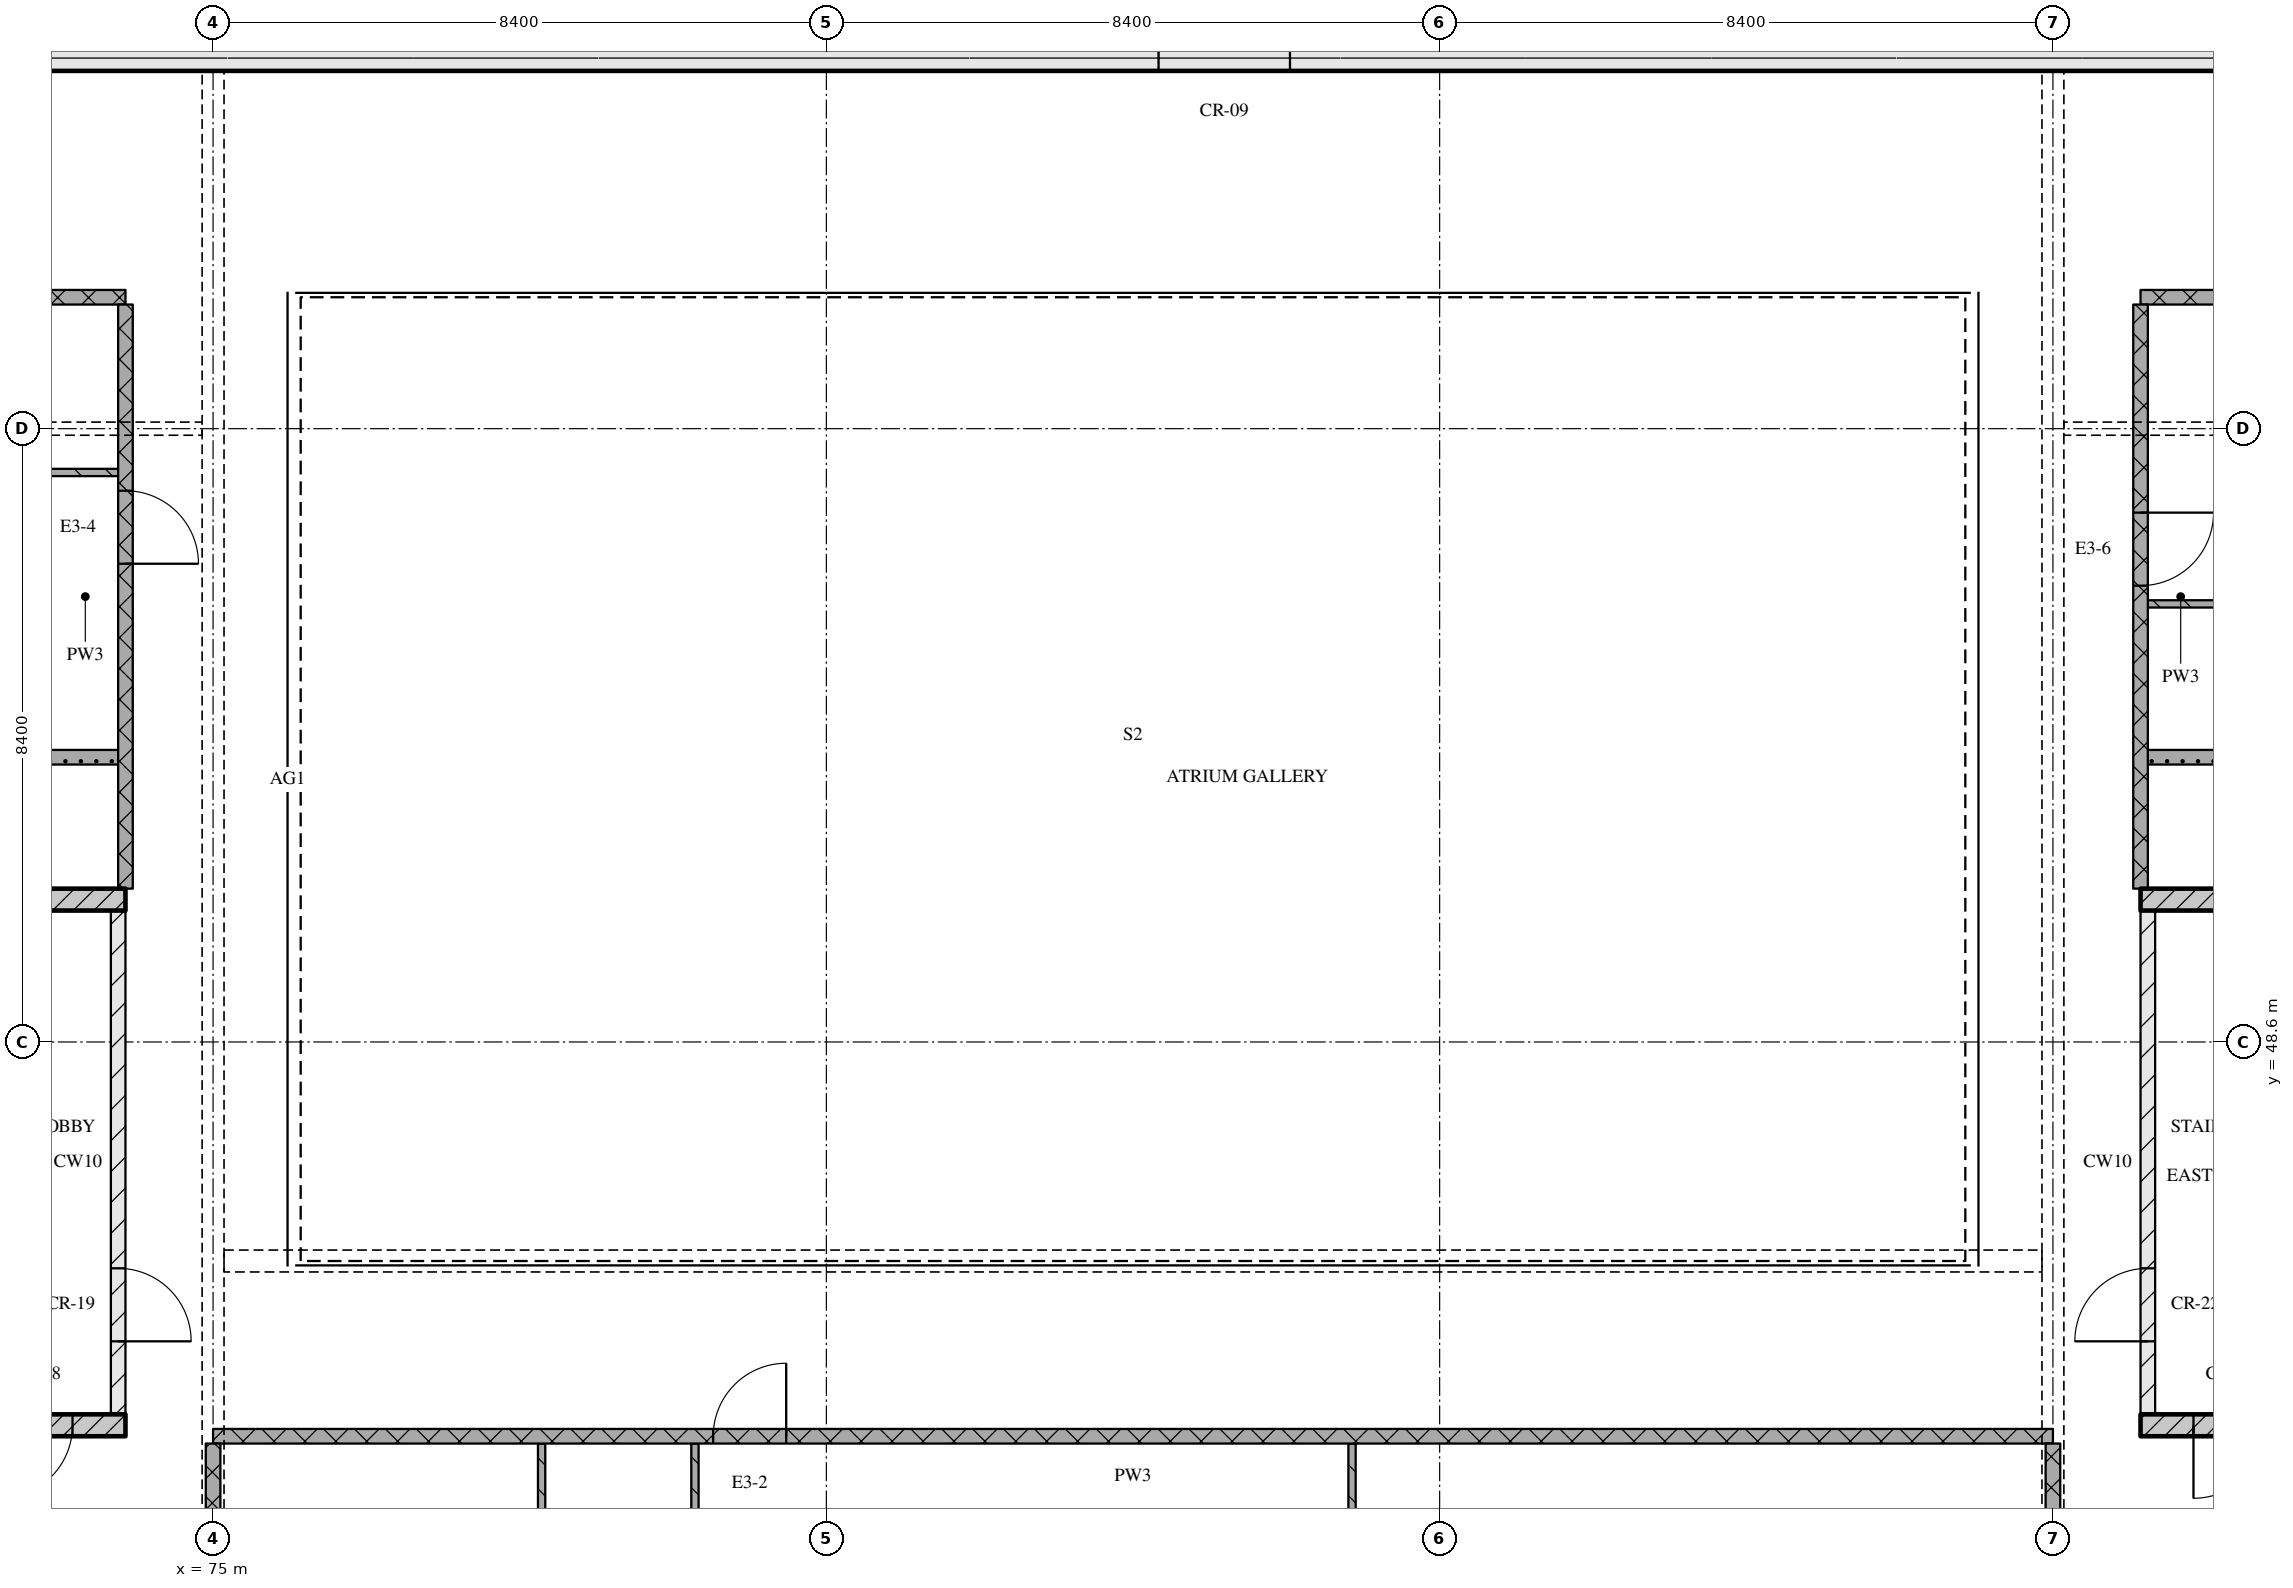
"""IFC4 building model, lengths in metres.
Left out: names, types, materials, properties, quantities, classifications, styles, units other than length and angle.
Written with IfcOpenShell. Run it as: python <this file> out.ifc"""

import sys

from ifc_helpers import new_model, si_unit, direction, frame, frame_2d, origin, place, context, subcontext, project, spatial, rectangle, extrude, element, fill, save


model = new_model("IFC4")
c1 = context("Model", 3, precision=1e-05, world=origin(), true_north=direction((0.0, 1.0)))
c2 = subcontext(c1, "Body", "Model", "MODEL_VIEW")
j1 = project(units=[si_unit("LENGTHUNIT", "METRE"), si_unit("PLANEANGLEUNIT", "RADIAN")], contexts=[c1])
p1 = place(None, origin())
s1 = spatial("IfcSite", under=j1, at=p1, CompositionType="ELEMENT")
p2 = place(p1, origin())
s2 = spatial("IfcBuilding", under=s1, at=p2, CompositionType="ELEMENT")
p3 = place(p2, frame((0.0, 0.0, 274.35)))
s3 = spatial("IfcBuildingStorey", under=s2, at=p3, CompositionType="ELEMENT", Elevation=274.35)
p4 = place(p3, frame((67.3, 62.15, 0.0), z_axis=(0.0, 0.0, 1.0), x_axis=(1.0, 0.0, 0.0)))
e1 = element("IfcWall", 1, at=p4, inside=s3, PredefinedType="SOLIDWALL", context=c2, shape_type="SweptSolid", body=[
    extrude(rectangle(XDim=40.6, YDim=0.5, at=frame_2d((20.3, 0.0))), origin(), (0.0, 0.0, 1.0), 3.32),
])
p5 = place(p4, frame((20.65, 0.0, 0.0)))
e2 = element("IfcOpeningElement", 2, at=p5, cuts=e1, PredefinedType="OPENING", context=c2, shape_type="SweptSolid", body=[
    extrude(rectangle(XDim=1.8, YDim=2.1, at=frame_2d((0.9, 1.05))), frame((0.0, 0.26, 0.0), z_axis=(0.0, -1.0, 0.0), x_axis=(1.0, 0.0, 0.0)), (0.0, 0.0, 1.0), 0.52),
])
p6 = place(p3, frame((68.2, 43.35, 0.0), z_axis=(0.0, 0.0, 1.0), x_axis=(1.0, 0.0, 0.0)))
e3 = element("IfcWall", 3, at=p6, inside=s3, PredefinedType="SOLIDWALL", context=c2, shape_type="SweptSolid", body=[
    extrude(rectangle(XDim=5.6, YDim=0.3, at=frame_2d((2.8, 0.0))), origin(), (0.0, 0.0, 1.0), 3.32),
])
p7 = place(p6, frame((3.875, 0.0, 0.0)))
e4 = element("IfcOpeningElement", 4, at=p7, cuts=e3, PredefinedType="OPENING", context=c2, shape_type="SweptSolid", body=[
    extrude(rectangle(XDim=1.0, YDim=2.1, at=frame_2d((0.5, 1.05))), frame((0.0, 0.16, 0.0), z_axis=(0.0, -1.0, 0.0), x_axis=(1.0, 0.0, 0.0)), (0.0, 0.0, 1.0), 0.32),
])
p8 = place(p3, frame((73.7, 43.5, 0.0), z_axis=(0.0, 0.0, 1.0), x_axis=(0.0, 1.0, 0.0)))
e5 = element("IfcWall", 5, at=p8, inside=s3, PredefinedType="PARTITIONING", context=c2, shape_type="SweptSolid", body=[
    extrude(rectangle(XDim=6.9, YDim=0.2, at=frame_2d((3.45, 0.0))), origin(), (0.0, 0.0, 1.0), 3.32),
])
p9 = place(p8, frame((1.0, 0.0, 0.0)))
e6 = element("IfcOpeningElement", 6, at=p9, cuts=e5, PredefinedType="OPENING", context=c2, shape_type="SweptSolid", body=[
    extrude(rectangle(XDim=1.0, YDim=2.1, at=frame_2d((0.5, 1.05))), frame((0.0, 0.11, 0.0), z_axis=(0.0, -1.0, 0.0), x_axis=(1.0, 0.0, 0.0)), (0.0, 0.0, 1.0), 0.22),
])
p10 = place(p3, frame((68.2, 50.55, 0.0), z_axis=(0.0, 0.0, 1.0), x_axis=(1.0, 0.0, 0.0)))
e7 = element("IfcWall", 7, at=p10, inside=s3, PredefinedType="SOLIDWALL", context=c2, shape_type="SweptSolid", body=[
    extrude(rectangle(XDim=5.6, YDim=0.3, at=frame_2d((2.8, 0.0))), origin(), (0.0, 0.0, 1.0), 3.32),
])
p11 = place(p3, frame((101.4, 43.35, 0.0), z_axis=(0.0, 0.0, 1.0), x_axis=(1.0, 0.0, 0.0)))
e8 = element("IfcWall", 8, at=p11, inside=s3, PredefinedType="SOLIDWALL", context=c2, shape_type="SweptSolid", body=[
    extrude(rectangle(XDim=5.6, YDim=0.3, at=frame_2d((2.8, 0.0))), origin(), (0.0, 0.0, 1.0), 3.32),
])
p12 = place(p11, frame((0.725, 0.0, 0.0)))
e9 = element("IfcOpeningElement", 9, at=p12, cuts=e8, PredefinedType="OPENING", context=c2, shape_type="SweptSolid", body=[
    extrude(rectangle(XDim=1.0, YDim=2.1, at=frame_2d((0.5, 1.05))), frame((0.0, 0.16, 0.0), z_axis=(0.0, -1.0, 0.0), x_axis=(1.0, 0.0, 0.0)), (0.0, 0.0, 1.0), 0.32),
])
p13 = place(p3, frame((101.5, 43.5, 0.0), z_axis=(0.0, 0.0, 1.0), x_axis=(0.0, 1.0, 0.0)))
e10 = element("IfcWall", 10, at=p13, inside=s3, PredefinedType="PARTITIONING", context=c2, shape_type="SweptSolid", body=[
    extrude(rectangle(XDim=6.9, YDim=0.2, at=frame_2d((3.45, 0.0))), origin(), (0.0, 0.0, 1.0), 3.32),
])
p14 = place(p13, frame((1.0, 0.0, 0.0)))
e11 = element("IfcOpeningElement", 11, at=p14, cuts=e10, PredefinedType="OPENING", context=c2, shape_type="SweptSolid", body=[
    extrude(rectangle(XDim=1.0, YDim=2.1, at=frame_2d((0.5, 1.05))), frame((0.0, 0.11, 0.0), z_axis=(0.0, -1.0, 0.0), x_axis=(1.0, 0.0, 0.0)), (0.0, 0.0, 1.0), 0.22),
])
p15 = place(p3, frame((101.4, 50.55, 0.0), z_axis=(0.0, 0.0, 1.0), x_axis=(1.0, 0.0, 0.0)))
e12 = element("IfcWall", 12, at=p15, inside=s3, PredefinedType="SOLIDWALL", context=c2, shape_type="SweptSolid", body=[
    extrude(rectangle(XDim=5.6, YDim=0.3, at=frame_2d((2.8, 0.0))), origin(), (0.0, 0.0, 1.0), 3.32),
])
p16 = place(p3, frame((100.2, 43.2, 0.0), z_axis=(0.0, 0.0, 1.0), x_axis=(-1.0, 0.0, 0.0)))
e13 = element("IfcWall", 13, at=p16, inside=s3, PredefinedType="PARTITIONING", context=c2, shape_type="SweptSolid", body=[
    extrude(rectangle(XDim=25.2, YDim=0.2, at=frame_2d((12.6, 0.0))), origin(), (0.0, 0.0, 1.0), 3.32),
])
p17 = place(p16, frame((17.35, 0.0, 0.0)))
e14 = element("IfcOpeningElement", 14, at=p17, cuts=e13, PredefinedType="OPENING", context=c2, shape_type="SweptSolid", body=[
    extrude(rectangle(XDim=1.0, YDim=2.1, at=frame_2d((0.5, 1.05))), frame((0.0, 0.11, 0.0), z_axis=(0.0, -1.0, 0.0), x_axis=(1.0, 0.0, 0.0)), (0.0, 0.0, 1.0), 0.22),
])
for number, where, z_axis, x_axis in (
    (15, (56.68, 52.5, 0.0), (0.0, 0.0, 1.0), (1.0, 0.0, 0.0)),
    (16, (101.5, 52.5, 0.0), (0.0, 0.0, 1.0), (1.0, 0.0, 0.0)),
):
    element("IfcWall", number, at=place(p3, frame(where, z_axis=z_axis, x_axis=x_axis)), inside=s3, PredefinedType="PARTITIONING", context=c2, shape_type="SweptSolid", body=[
        extrude(rectangle(XDim=17.02, YDim=0.2, at=frame_2d((8.51, 0.0))), origin(), (0.0, 0.0, 1.0), 3.32),
    ])
for number, where, z_axis, x_axis in (
    (17, (101.5, 54.6, 0.0), (0.0, 0.0, 1.0), (1.0, 0.0, 0.0)),
    (18, (65.7, 56.4, 0.0), (0.0, 0.0, 1.0), (1.0, 0.0, 0.0)),
):
    element("IfcWall", number, at=place(p3, frame(where, z_axis=z_axis, x_axis=x_axis)), inside=s3, PredefinedType="PARTITIONING", context=c2, shape_type="SweptSolid", body=[
        extrude(rectangle(XDim=8.0, YDim=0.1, at=frame_2d((4.0, 0.0))), origin(), (0.0, 0.0, 1.0), 3.32),
    ])
for number, where, z_axis, x_axis in (
    (19, (64.2, 58.8, 0.0), (0.0, 0.0, 1.0), (1.0, 0.0, 0.0)),
    (20, (101.4, 58.8, 0.0), (0.0, 0.0, 1.0), (1.0, 0.0, 0.0)),
):
    element("IfcWall", number, at=place(p3, frame(where, z_axis=z_axis, x_axis=x_axis)), inside=s3, PredefinedType="PARTITIONING", context=c2, shape_type="SweptSolid", body=[
        extrude(rectangle(XDim=9.6, YDim=0.2, at=frame_2d((4.8, 0.0))), origin(), (0.0, 0.0, 1.0), 3.32),
    ])
p18 = place(p3, frame((73.8, 50.7, 0.0), z_axis=(0.0, 0.0, 1.0), x_axis=(0.0, 1.0, 0.0)))
e21 = element("IfcWall", 21, at=p18, inside=s3, PredefinedType="PARTITIONING", context=c2, shape_type="SweptSolid", body=[
    extrude(rectangle(XDim=8.0, YDim=0.2, at=frame_2d((4.0, 0.0))), origin(), (0.0, 0.0, 1.0), 3.32),
])
p19 = place(p18, frame((4.45, 0.0, 0.0)))
e22 = element("IfcOpeningElement", 22, at=p19, cuts=e21, PredefinedType="OPENING", context=c2, shape_type="SweptSolid", body=[
    extrude(rectangle(XDim=1.0, YDim=2.1, at=frame_2d((0.5, 1.05))), frame((0.0, 0.11, 0.0), z_axis=(0.0, -1.0, 0.0), x_axis=(1.0, 0.0, 0.0)), (0.0, 0.0, 1.0), 0.22),
])
p20 = place(p3, frame((75.0, 43.1, 0.0), z_axis=(0.0, 0.0, 1.0), x_axis=(0.0, -1.0, 0.0)))
e23 = element("IfcWall", 23, at=p20, inside=s3, PredefinedType="PARTITIONING", context=c2, shape_type="SweptSolid", body=[
    extrude(rectangle(XDim=2.2, YDim=0.2, at=frame_2d((1.1, 0.0))), origin(), (0.0, 0.0, 1.0), 2.53),
])
p21 = place(p3, frame((79.5, 43.1, 0.0), z_axis=(0.0, 0.0, 1.0), x_axis=(0.0, -1.0, 0.0)))
e24 = element("IfcWall", 24, at=p21, inside=s3, PredefinedType="PARTITIONING", context=c2, shape_type="SweptSolid", body=[
    extrude(rectangle(XDim=4.95, YDim=0.1, at=frame_2d((2.475, 0.0))), origin(), (0.0, 0.0, 1.0), 3.32),
])
p22 = place(p3, frame((81.6, 38.15, 0.0), z_axis=(0.0, 0.0, 1.0), x_axis=(0.0, 1.0, 0.0)))
e25 = element("IfcWall", 25, at=p22, inside=s3, PredefinedType="PARTITIONING", context=c2, shape_type="SweptSolid", body=[
    extrude(rectangle(XDim=4.95, YDim=0.1, at=frame_2d((2.475, 0.0))), origin(), (0.0, 0.0, 1.0), 3.32),
])
p23 = place(p22, frame((2.1, 0.0, 0.0)))
e26 = element("IfcOpeningElement", 26, at=p23, cuts=e25, PredefinedType="OPENING", context=c2, shape_type="SweptSolid", body=[
    extrude(rectangle(XDim=0.8, YDim=2.1, at=frame_2d((0.4, 1.05))), frame((0.0, 0.06, 0.0), z_axis=(0.0, -1.0, 0.0), x_axis=(1.0, 0.0, 0.0)), (0.0, 0.0, 1.0), 0.12),
])
p24 = place(p3, frame((90.6, 43.1, 0.0), z_axis=(0.0, 0.0, 1.0), x_axis=(0.0, -1.0, 0.0)))
e27 = element("IfcWall", 27, at=p24, inside=s3, PredefinedType="PARTITIONING", context=c2, shape_type="SweptSolid", body=[
    extrude(rectangle(XDim=4.95, YDim=0.1, at=frame_2d((2.475, 0.0))), origin(), (0.0, 0.0, 1.0), 3.32),
])
p25 = place(p3, frame((100.2, 43.1, 0.0), z_axis=(0.0, 0.0, 1.0), x_axis=(0.0, -1.0, 0.0)))
e28 = element("IfcWall", 28, at=p25, inside=s3, PredefinedType="PARTITIONING", context=c2, shape_type="SweptSolid", body=[
    extrude(rectangle(XDim=2.2, YDim=0.2, at=frame_2d((1.1, 0.0))), origin(), (0.0, 0.0, 1.0), 2.53),
])
p26 = place(p3, frame((101.4, 58.7, 0.0), z_axis=(0.0, 0.0, 1.0), x_axis=(0.0, -1.0, 0.0)))
e29 = element("IfcWall", 29, at=p26, inside=s3, PredefinedType="PARTITIONING", context=c2, shape_type="SweptSolid", body=[
    extrude(rectangle(XDim=8.0, YDim=0.2, at=frame_2d((4.0, 0.0))), origin(), (0.0, 0.0, 1.0), 3.32),
])
p27 = place(p26, frame((2.85, 0.0, 0.0)))
e30 = element("IfcOpeningElement", 30, at=p27, cuts=e29, PredefinedType="OPENING", context=c2, shape_type="SweptSolid", body=[
    extrude(rectangle(XDim=1.0, YDim=2.1, at=frame_2d((0.5, 1.05))), frame((0.0, 0.11, 0.0), z_axis=(0.0, -1.0, 0.0), x_axis=(1.0, 0.0, 0.0)), (0.0, 0.0, 1.0), 0.22),
])
p28 = place(p5, origin())
e31 = element("IfcDoor", 31, at=p28, inside=s3, OperationType="DOUBLE_DOOR_SINGLE_SWING", PredefinedType="DOOR", context=c2, shape_type="SweptSolid", body=[
    extrude(rectangle(XDim=1.8, YDim=2.1, at=frame_2d((0.9, 1.05))), frame((0.0, 0.025, 0.0), z_axis=(0.0, -1.0, 0.0), x_axis=(1.0, 0.0, 0.0)), (0.0, 0.0, 1.0), 0.05),
])
fill(e2, e31)
p29 = place(p7, origin())
e32 = element("IfcDoor", 32, at=p29, inside=s3, OperationType="SINGLE_SWING_RIGHT", PredefinedType="DOOR", context=c2, shape_type="SweptSolid", body=[
    extrude(rectangle(XDim=1.0, YDim=2.1, at=frame_2d((0.5, 1.05))), frame((0.0, 0.025, 0.0), z_axis=(0.0, -1.0, 0.0), x_axis=(1.0, 0.0, 0.0)), (0.0, 0.0, 1.0), 0.05),
])
fill(e4, e32)
p30 = place(p9, origin())
e33 = element("IfcDoor", 33, at=p30, inside=s3, OperationType="SINGLE_SWING_RIGHT", PredefinedType="DOOR", context=c2, shape_type="SweptSolid", body=[
    extrude(rectangle(XDim=1.0, YDim=2.1, at=frame_2d((0.5, 1.05))), frame((0.0, 0.025, 0.0), z_axis=(0.0, -1.0, 0.0), x_axis=(1.0, 0.0, 0.0)), (0.0, 0.0, 1.0), 0.05),
])
fill(e6, e33)
p31 = place(p12, origin())
e34 = element("IfcDoor", 34, at=p31, inside=s3, OperationType="SINGLE_SWING_RIGHT", PredefinedType="DOOR", context=c2, shape_type="SweptSolid", body=[
    extrude(rectangle(XDim=1.0, YDim=2.1, at=frame_2d((0.5, 1.05))), frame((0.0, 0.025, 0.0), z_axis=(0.0, -1.0, 0.0), x_axis=(1.0, 0.0, 0.0)), (0.0, 0.0, 1.0), 0.05),
])
fill(e9, e34)
p32 = place(p14, origin())
e35 = element("IfcDoor", 35, at=p32, inside=s3, OperationType="SINGLE_SWING_LEFT", PredefinedType="DOOR", context=c2, shape_type="SweptSolid", body=[
    extrude(rectangle(XDim=1.0, YDim=2.1, at=frame_2d((0.5, 1.05))), frame((0.0, 0.025, 0.0), z_axis=(0.0, -1.0, 0.0), x_axis=(1.0, 0.0, 0.0)), (0.0, 0.0, 1.0), 0.05),
])
fill(e11, e35)
p33 = place(p17, origin())
e36 = element("IfcDoor", 36, at=p33, inside=s3, OperationType="SINGLE_SWING_RIGHT", PredefinedType="DOOR", context=c2, shape_type="SweptSolid", body=[
    extrude(rectangle(XDim=1.0, YDim=2.1, at=frame_2d((0.5, 1.05))), frame((0.0, 0.025, 0.0), z_axis=(0.0, -1.0, 0.0), x_axis=(1.0, 0.0, 0.0)), (0.0, 0.0, 1.0), 0.05),
])
fill(e14, e36)
p34 = place(p19, origin())
e37 = element("IfcDoor", 37, at=p34, inside=s3, OperationType="SINGLE_SWING_RIGHT", PredefinedType="DOOR", context=c2, shape_type="SweptSolid", body=[
    extrude(rectangle(XDim=1.0, YDim=2.1, at=frame_2d((0.5, 1.05))), frame((0.0, 0.025, 0.0), z_axis=(0.0, -1.0, 0.0), x_axis=(1.0, 0.0, 0.0)), (0.0, 0.0, 1.0), 0.05),
])
fill(e22, e37)
p35 = place(p27, origin())
e38 = element("IfcDoor", 38, at=p35, inside=s3, OperationType="SINGLE_SWING_LEFT", PredefinedType="DOOR", context=c2, shape_type="SweptSolid", body=[
    extrude(rectangle(XDim=1.0, YDim=2.1, at=frame_2d((0.5, 1.05))), frame((0.0, 0.025, 0.0), z_axis=(0.0, -1.0, 0.0), x_axis=(1.0, 0.0, 0.0)), (0.0, 0.0, 1.0), 0.05),
])
fill(e30, e38)
save(model, sys.argv[1])
